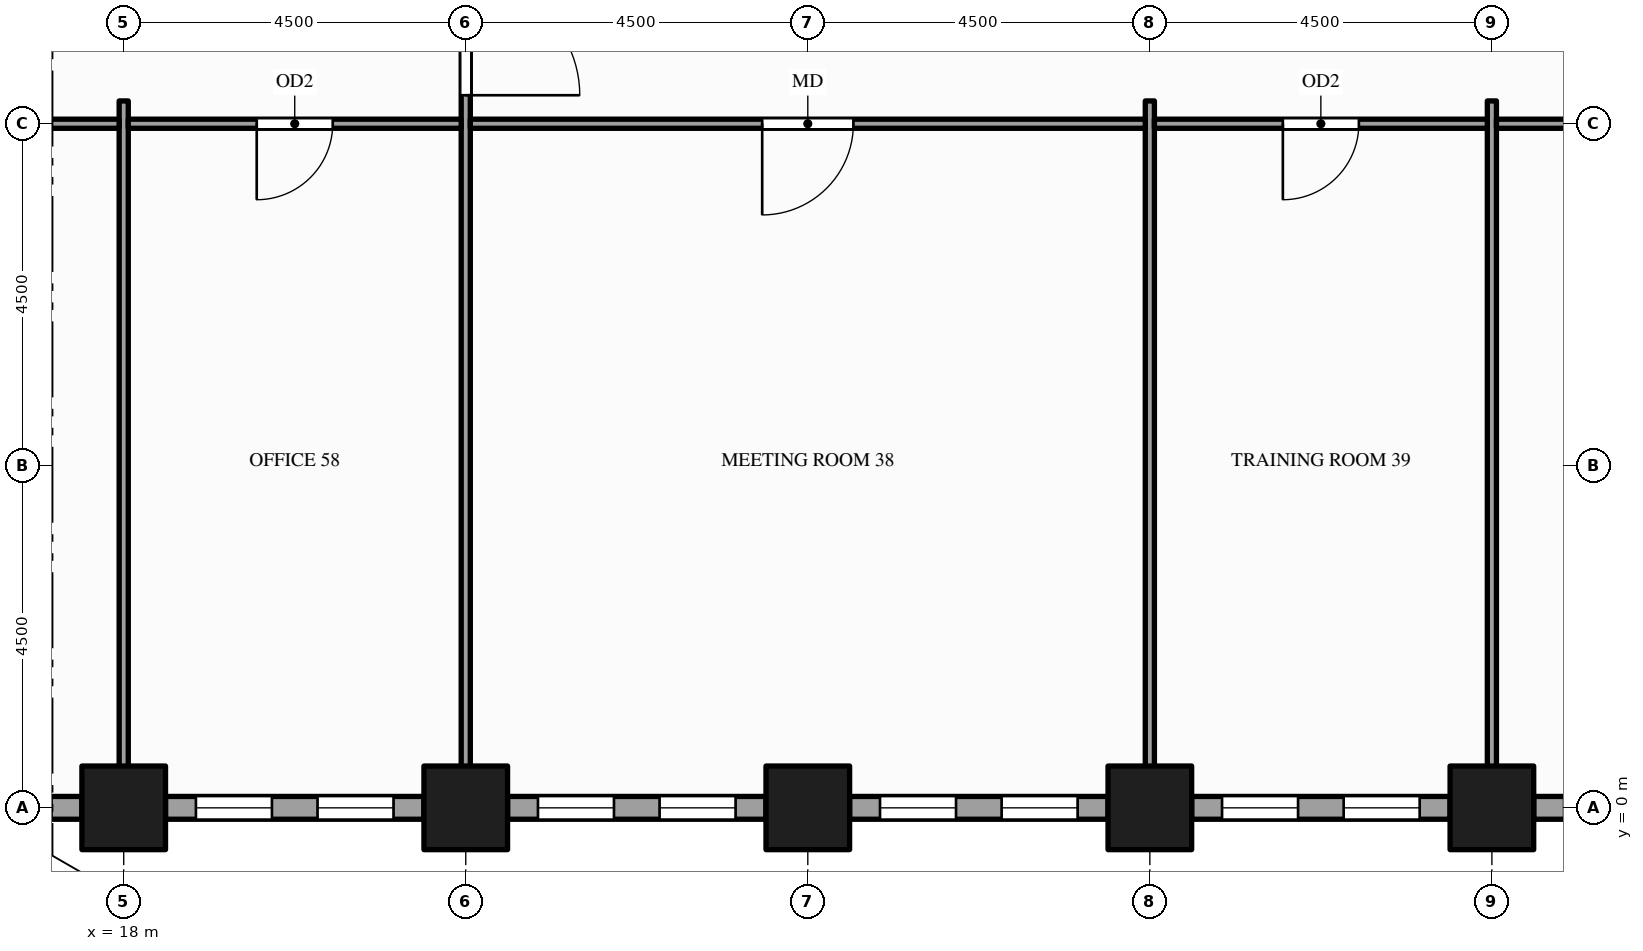
"""IFC4 building model, lengths in metres.
Left out: names, types, materials, properties, quantities, classifications, styles, units other than length and angle.
Written with IfcOpenShell. Run it as: python <this file> out.ifc"""

import sys

from ifc_helpers import new_model, si_unit, direction, frame, frame_2d, origin, origin_2d, place, context, subcontext, project, spatial, rectangle, hollow_rectangle, extrude, element, fill, save


model = new_model("IFC4")
c1 = context("Model", 3, precision=1e-05, world=origin(), true_north=direction((0.0, 1.0)))
c2 = subcontext(c1, "Body", "Model", "MODEL_VIEW")
j1 = project(units=[si_unit("LENGTHUNIT", "METRE"), si_unit("PLANEANGLEUNIT", "RADIAN")], contexts=[c1])
p1 = place(None, origin())
s1 = spatial("IfcSite", under=j1, at=p1, CompositionType="ELEMENT")
p2 = place(p1, origin())
s2 = spatial("IfcBuilding", under=s1, at=p2, CompositionType="ELEMENT")
p3 = place(p2, frame((0.0, 0.0, 8.0)))
s3 = spatial("IfcBuildingStorey", under=s2, at=p3, CompositionType="ELEMENT", Elevation=8.0)
for number, where, z_axis, x_axis in (
    (1, (18.0, 0.0, -0.25), (0.0, 0.0, 1.0), (1.0, 0.0, 0.0)),
    (2, (22.5, 0.0, -0.25), (0.0, 0.0, 1.0), (1.0, 0.0, 0.0)),
    (3, (27.0, 0.0, -0.25), (0.0, 0.0, 1.0), (1.0, 0.0, 0.0)),
    (4, (31.5, 0.0, -0.25), (0.0, 0.0, 1.0), (1.0, 0.0, 0.0)),
    (5, (36.0, 0.0, -0.25), (0.0, 0.0, 1.0), (1.0, 0.0, 0.0)),
):
    element("IfcColumn", number, at=place(p3, frame(where, z_axis=z_axis, x_axis=x_axis)), inside=s3, PredefinedType="COLUMN", context=c2, shape_type="SweptSolid", body=[
        extrude(hollow_rectangle(XDim=1.1, YDim=1.1, WallThickness=0.06, at=origin_2d()), origin(), (0.0, 0.0, 1.0), 6.0),
    ])
p4 = place(p3, frame((14.05, 0.0, 0.0), z_axis=(0.0, 0.0, 1.0), x_axis=(1.0, 0.0, 0.0)))
e6 = element("IfcWall", 6, at=p4, inside=s3, PredefinedType="STANDARD", context=c2, shape_type="SweptSolid", body=[
    extrude(rectangle(XDim=3.4, YDim=0.3, at=frame_2d((1.7, 0.0))), origin(), (0.0, 0.0, 1.0), 5.036),
])
p5 = place(p4, frame((0.4, 0.0, 0.9)))
e7 = element("IfcOpeningElement", 7, at=p5, cuts=e6, PredefinedType="OPENING", context=c2, shape_type="SweptSolid", body=[
    extrude(rectangle(XDim=1.0, YDim=3.5, at=frame_2d((0.5, 1.75))), frame((0.0, 0.16, 0.0), z_axis=(0.0, -1.0, 0.0), x_axis=(1.0, 0.0, 0.0)), (0.0, 0.0, 1.0), 0.32),
])
p6 = place(p4, frame((2.0, 0.0, 0.9)))
e8 = element("IfcOpeningElement", 8, at=p6, cuts=e6, PredefinedType="OPENING", context=c2, shape_type="SweptSolid", body=[
    extrude(rectangle(XDim=1.0, YDim=3.5, at=frame_2d((0.5, 1.75))), frame((0.0, 0.16, 0.0), z_axis=(0.0, -1.0, 0.0), x_axis=(1.0, 0.0, 0.0)), (0.0, 0.0, 1.0), 0.32),
])
p7 = place(p3, frame((18.55, 0.0, 0.0), z_axis=(0.0, 0.0, 1.0), x_axis=(1.0, 0.0, 0.0)))
e9 = element("IfcWall", 9, at=p7, inside=s3, PredefinedType="STANDARD", context=c2, shape_type="SweptSolid", body=[
    extrude(rectangle(XDim=3.4, YDim=0.3, at=frame_2d((1.7, 0.0))), origin(), (0.0, 0.0, 1.0), 5.036),
])
p8 = place(p7, frame((0.4, 0.0, 0.9)))
e10 = element("IfcOpeningElement", 10, at=p8, cuts=e9, PredefinedType="OPENING", context=c2, shape_type="SweptSolid", body=[
    extrude(rectangle(XDim=1.0, YDim=3.5, at=frame_2d((0.5, 1.75))), frame((0.0, 0.16, 0.0), z_axis=(0.0, -1.0, 0.0), x_axis=(1.0, 0.0, 0.0)), (0.0, 0.0, 1.0), 0.32),
])
p9 = place(p7, frame((2.0, 0.0, 0.9)))
e11 = element("IfcOpeningElement", 11, at=p9, cuts=e9, PredefinedType="OPENING", context=c2, shape_type="SweptSolid", body=[
    extrude(rectangle(XDim=1.0, YDim=3.5, at=frame_2d((0.5, 1.75))), frame((0.0, 0.16, 0.0), z_axis=(0.0, -1.0, 0.0), x_axis=(1.0, 0.0, 0.0)), (0.0, 0.0, 1.0), 0.32),
])
p10 = place(p3, frame((23.05, 0.0, 0.0), z_axis=(0.0, 0.0, 1.0), x_axis=(1.0, 0.0, 0.0)))
e12 = element("IfcWall", 12, at=p10, inside=s3, PredefinedType="STANDARD", context=c2, shape_type="SweptSolid", body=[
    extrude(rectangle(XDim=3.4, YDim=0.3, at=frame_2d((1.7, 0.0))), origin(), (0.0, 0.0, 1.0), 5.036),
])
p11 = place(p10, frame((0.4, 0.0, 0.9)))
e13 = element("IfcOpeningElement", 13, at=p11, cuts=e12, PredefinedType="OPENING", context=c2, shape_type="SweptSolid", body=[
    extrude(rectangle(XDim=1.0, YDim=3.5, at=frame_2d((0.5, 1.75))), frame((0.0, 0.16, 0.0), z_axis=(0.0, -1.0, 0.0), x_axis=(1.0, 0.0, 0.0)), (0.0, 0.0, 1.0), 0.32),
])
p12 = place(p10, frame((2.0, 0.0, 0.9)))
e14 = element("IfcOpeningElement", 14, at=p12, cuts=e12, PredefinedType="OPENING", context=c2, shape_type="SweptSolid", body=[
    extrude(rectangle(XDim=1.0, YDim=3.5, at=frame_2d((0.5, 1.75))), frame((0.0, 0.16, 0.0), z_axis=(0.0, -1.0, 0.0), x_axis=(1.0, 0.0, 0.0)), (0.0, 0.0, 1.0), 0.32),
])
p13 = place(p3, frame((27.55, 0.0, 0.0), z_axis=(0.0, 0.0, 1.0), x_axis=(1.0, 0.0, 0.0)))
e15 = element("IfcWall", 15, at=p13, inside=s3, PredefinedType="STANDARD", context=c2, shape_type="SweptSolid", body=[
    extrude(rectangle(XDim=3.4, YDim=0.3, at=frame_2d((1.7, 0.0))), origin(), (0.0, 0.0, 1.0), 5.036),
])
p14 = place(p13, frame((0.4, 0.0, 0.9)))
e16 = element("IfcOpeningElement", 16, at=p14, cuts=e15, PredefinedType="OPENING", context=c2, shape_type="SweptSolid", body=[
    extrude(rectangle(XDim=1.0, YDim=3.5, at=frame_2d((0.5, 1.75))), frame((0.0, 0.16, 0.0), z_axis=(0.0, -1.0, 0.0), x_axis=(1.0, 0.0, 0.0)), (0.0, 0.0, 1.0), 0.32),
])
p15 = place(p13, frame((2.0, 0.0, 0.9)))
e17 = element("IfcOpeningElement", 17, at=p15, cuts=e15, PredefinedType="OPENING", context=c2, shape_type="SweptSolid", body=[
    extrude(rectangle(XDim=1.0, YDim=3.5, at=frame_2d((0.5, 1.75))), frame((0.0, 0.16, 0.0), z_axis=(0.0, -1.0, 0.0), x_axis=(1.0, 0.0, 0.0)), (0.0, 0.0, 1.0), 0.32),
])
p16 = place(p3, frame((32.05, 0.0, 0.0), z_axis=(0.0, 0.0, 1.0), x_axis=(1.0, 0.0, 0.0)))
e18 = element("IfcWall", 18, at=p16, inside=s3, PredefinedType="STANDARD", context=c2, shape_type="SweptSolid", body=[
    extrude(rectangle(XDim=3.4, YDim=0.3, at=frame_2d((1.7, 0.0))), origin(), (0.0, 0.0, 1.0), 5.036),
])
p17 = place(p16, frame((0.4, 0.0, 0.9)))
e19 = element("IfcOpeningElement", 19, at=p17, cuts=e18, PredefinedType="OPENING", context=c2, shape_type="SweptSolid", body=[
    extrude(rectangle(XDim=1.0, YDim=3.5, at=frame_2d((0.5, 1.75))), frame((0.0, 0.16, 0.0), z_axis=(0.0, -1.0, 0.0), x_axis=(1.0, 0.0, 0.0)), (0.0, 0.0, 1.0), 0.32),
])
p18 = place(p16, frame((2.0, 0.0, 0.9)))
e20 = element("IfcOpeningElement", 20, at=p18, cuts=e18, PredefinedType="OPENING", context=c2, shape_type="SweptSolid", body=[
    extrude(rectangle(XDim=1.0, YDim=3.5, at=frame_2d((0.5, 1.75))), frame((0.0, 0.16, 0.0), z_axis=(0.0, -1.0, 0.0), x_axis=(1.0, 0.0, 0.0)), (0.0, 0.0, 1.0), 0.32),
])
p19 = place(p3, frame((36.55, 0.0, 0.0), z_axis=(0.0, 0.0, 1.0), x_axis=(1.0, 0.0, 0.0)))
e21 = element("IfcWall", 21, at=p19, inside=s3, PredefinedType="STANDARD", context=c2, shape_type="SweptSolid", body=[
    extrude(rectangle(XDim=3.4, YDim=0.3, at=frame_2d((1.7, 0.0))), origin(), (0.0, 0.0, 1.0), 5.036),
])
p20 = place(p19, frame((0.4, 0.0, 0.9)))
e22 = element("IfcOpeningElement", 22, at=p20, cuts=e21, PredefinedType="OPENING", context=c2, shape_type="SweptSolid", body=[
    extrude(rectangle(XDim=1.0, YDim=3.5, at=frame_2d((0.5, 1.75))), frame((0.0, 0.16, 0.0), z_axis=(0.0, -1.0, 0.0), x_axis=(1.0, 0.0, 0.0)), (0.0, 0.0, 1.0), 0.32),
])
p21 = place(p19, frame((2.0, 0.0, 0.9)))
e23 = element("IfcOpeningElement", 23, at=p21, cuts=e21, PredefinedType="OPENING", context=c2, shape_type="SweptSolid", body=[
    extrude(rectangle(XDim=1.0, YDim=3.5, at=frame_2d((0.5, 1.75))), frame((0.0, 0.16, 0.0), z_axis=(0.0, -1.0, 0.0), x_axis=(1.0, 0.0, 0.0)), (0.0, 0.0, 1.0), 0.32),
])
p22 = place(p3, frame((18.0, 0.15, 0.0), z_axis=(0.0, 0.0, 1.0), x_axis=(0.0, 1.0, 0.0)))
e24 = element("IfcWall", 24, at=p22, inside=s3, PredefinedType="PARTITIONING", context=c2, shape_type="SweptSolid", body=[
    extrude(rectangle(XDim=9.15, YDim=0.12, at=frame_2d((4.575, 0.0))), origin(), (0.0, 0.0, 1.0), 4.759),
])
p23 = place(p3, frame((22.5, 0.15, 0.0), z_axis=(0.0, 0.0, 1.0), x_axis=(0.0, 1.0, 0.0)))
e25 = element("IfcWall", 25, at=p23, inside=s3, PredefinedType="PARTITIONING", context=c2, shape_type="SweptSolid", body=[
    extrude(rectangle(XDim=35.95, YDim=0.12, at=frame_2d((17.975, 0.0))), origin(), (0.0, 0.0, 1.0), 4.759),
])
p24 = place(p23, frame((9.225, 0.0, 0.0)))
e26 = element("IfcOpeningElement", 26, at=p24, cuts=e25, PredefinedType="OPENING", context=c2, shape_type="SweptSolid", body=[
    extrude(rectangle(XDim=1.5, YDim=2.1, at=frame_2d((0.75, 1.05))), frame((0.0, 0.07, 0.0), z_axis=(0.0, -1.0, 0.0), x_axis=(1.0, 0.0, 0.0)), (0.0, 0.0, 1.0), 0.14),
])
p25 = place(p23, frame((32.7, 0.0, 0.0)))
e27 = element("IfcOpeningElement", 27, at=p25, cuts=e25, PredefinedType="OPENING", context=c2, shape_type="SweptSolid", body=[
    extrude(rectangle(XDim=1.8, YDim=2.1, at=frame_2d((0.9, 1.05))), frame((0.0, 0.07, 0.0), z_axis=(0.0, -1.0, 0.0), x_axis=(1.0, 0.0, 0.0)), (0.0, 0.0, 1.0), 0.14),
])
for number, where, z_axis, x_axis in (
    (28, (31.5, 0.15, 0.0), (0.0, 0.0, 1.0), (0.0, 1.0, 0.0)),
    (29, (36.0, 0.15, 0.0), (0.0, 0.0, 1.0), (0.0, 1.0, 0.0)),
):
    element("IfcWall", number, at=place(p3, frame(where, z_axis=z_axis, x_axis=x_axis)), inside=s3, PredefinedType="PARTITIONING", context=c2, shape_type="SweptSolid", body=[
        extrude(rectangle(XDim=9.15, YDim=0.12, at=frame_2d((4.575, 0.0))), origin(), (0.0, 0.0, 1.0), 4.759),
    ])
p26 = place(p3, frame((9.06, 9.0, 0.0), z_axis=(0.0, 0.0, 1.0), x_axis=(1.0, 0.0, 0.0)))
e30 = element("IfcWall", 30, at=p26, inside=s3, PredefinedType="PARTITIONING", context=c2, shape_type="SweptSolid", body=[
    extrude(rectangle(XDim=8.88, YDim=0.12, at=frame_2d((4.44, 0.0))), origin(), (0.0, 0.0, 1.0), 4.759),
])
p27 = place(p26, frame((3.94, 0.0, 0.0)))
e31 = element("IfcOpeningElement", 31, at=p27, cuts=e30, PredefinedType="OPENING", context=c2, shape_type="SweptSolid", body=[
    extrude(rectangle(XDim=1.0, YDim=2.1, at=frame_2d((0.5, 1.05))), frame((0.0, 0.07, 0.0), z_axis=(0.0, -1.0, 0.0), x_axis=(1.0, 0.0, 0.0)), (0.0, 0.0, 1.0), 0.14),
])
p28 = place(p3, frame((18.06, 9.0, 0.0), z_axis=(0.0, 0.0, 1.0), x_axis=(1.0, 0.0, 0.0)))
e32 = element("IfcWall", 32, at=p28, inside=s3, PredefinedType="PARTITIONING", context=c2, shape_type="SweptSolid", body=[
    extrude(rectangle(XDim=4.38, YDim=0.12, at=frame_2d((2.19, 0.0))), origin(), (0.0, 0.0, 1.0), 4.759),
])
p29 = place(p28, frame((1.69, 0.0, 0.0)))
e33 = element("IfcOpeningElement", 33, at=p29, cuts=e32, PredefinedType="OPENING", context=c2, shape_type="SweptSolid", body=[
    extrude(rectangle(XDim=1.0, YDim=2.1, at=frame_2d((0.5, 1.05))), frame((0.0, 0.07, 0.0), z_axis=(0.0, -1.0, 0.0), x_axis=(1.0, 0.0, 0.0)), (0.0, 0.0, 1.0), 0.14),
])
p30 = place(p3, frame((22.56, 9.0, 0.0), z_axis=(0.0, 0.0, 1.0), x_axis=(1.0, 0.0, 0.0)))
e34 = element("IfcWall", 34, at=p30, inside=s3, PredefinedType="PARTITIONING", context=c2, shape_type="SweptSolid", body=[
    extrude(rectangle(XDim=8.88, YDim=0.12, at=frame_2d((4.44, 0.0))), origin(), (0.0, 0.0, 1.0), 4.66),
])
p31 = place(p30, frame((3.84, 0.0, 0.0)))
e35 = element("IfcOpeningElement", 35, at=p31, cuts=e34, PredefinedType="OPENING", context=c2, shape_type="SweptSolid", body=[
    extrude(rectangle(XDim=1.2, YDim=2.1, at=frame_2d((0.6, 1.05))), frame((0.0, 0.07, 0.0), z_axis=(0.0, -1.0, 0.0), x_axis=(1.0, 0.0, 0.0)), (0.0, 0.0, 1.0), 0.14),
])
p32 = place(p3, frame((31.56, 9.0, 0.0), z_axis=(0.0, 0.0, 1.0), x_axis=(1.0, 0.0, 0.0)))
e36 = element("IfcWall", 36, at=p32, inside=s3, PredefinedType="PARTITIONING", context=c2, shape_type="SweptSolid", body=[
    extrude(rectangle(XDim=4.38, YDim=0.12, at=frame_2d((2.19, 0.0))), origin(), (0.0, 0.0, 1.0), 4.66),
])
p33 = place(p32, frame((1.69, 0.0, 0.0)))
e37 = element("IfcOpeningElement", 37, at=p33, cuts=e36, PredefinedType="OPENING", context=c2, shape_type="SweptSolid", body=[
    extrude(rectangle(XDim=1.0, YDim=2.1, at=frame_2d((0.5, 1.05))), frame((0.0, 0.07, 0.0), z_axis=(0.0, -1.0, 0.0), x_axis=(1.0, 0.0, 0.0)), (0.0, 0.0, 1.0), 0.14),
])
p34 = place(p3, frame((36.06, 9.0, 0.0), z_axis=(0.0, 0.0, 1.0), x_axis=(1.0, 0.0, 0.0)))
e38 = element("IfcWall", 38, at=p34, inside=s3, PredefinedType="PARTITIONING", context=c2, shape_type="SweptSolid", body=[
    extrude(rectangle(XDim=4.38, YDim=0.12, at=frame_2d((2.19, 0.0))), origin(), (0.0, 0.0, 1.0), 4.66),
])
p35 = place(p34, frame((1.69, 0.0, 0.0)))
e39 = element("IfcOpeningElement", 39, at=p35, cuts=e38, PredefinedType="OPENING", context=c2, shape_type="SweptSolid", body=[
    extrude(rectangle(XDim=1.0, YDim=2.1, at=frame_2d((0.5, 1.05))), frame((0.0, 0.07, 0.0), z_axis=(0.0, -1.0, 0.0), x_axis=(1.0, 0.0, 0.0)), (0.0, 0.0, 1.0), 0.14),
])
p36 = place(p8, origin())
e40 = element("IfcWindow", 40, at=p36, inside=s3, PartitioningType="SINGLE_PANEL", PredefinedType="WINDOW", context=c2, shape_type="SweptSolid", body=[
    extrude(rectangle(XDim=1.0, YDim=3.5, at=frame_2d((0.5, 1.75))), frame((0.0, 0.03, 0.0), z_axis=(0.0, -1.0, 0.0), x_axis=(1.0, 0.0, 0.0)), (0.0, 0.0, 1.0), 0.06),
])
fill(e10, e40)
p37 = place(p9, origin())
e41 = element("IfcWindow", 41, at=p37, inside=s3, PartitioningType="SINGLE_PANEL", PredefinedType="WINDOW", context=c2, shape_type="SweptSolid", body=[
    extrude(rectangle(XDim=1.0, YDim=3.5, at=frame_2d((0.5, 1.75))), frame((0.0, 0.03, 0.0), z_axis=(0.0, -1.0, 0.0), x_axis=(1.0, 0.0, 0.0)), (0.0, 0.0, 1.0), 0.06),
])
fill(e11, e41)
p38 = place(p11, origin())
e42 = element("IfcWindow", 42, at=p38, inside=s3, PartitioningType="SINGLE_PANEL", PredefinedType="WINDOW", context=c2, shape_type="SweptSolid", body=[
    extrude(rectangle(XDim=1.0, YDim=3.5, at=frame_2d((0.5, 1.75))), frame((0.0, 0.03, 0.0), z_axis=(0.0, -1.0, 0.0), x_axis=(1.0, 0.0, 0.0)), (0.0, 0.0, 1.0), 0.06),
])
fill(e13, e42)
p39 = place(p12, origin())
e43 = element("IfcWindow", 43, at=p39, inside=s3, PartitioningType="SINGLE_PANEL", PredefinedType="WINDOW", context=c2, shape_type="SweptSolid", body=[
    extrude(rectangle(XDim=1.0, YDim=3.5, at=frame_2d((0.5, 1.75))), frame((0.0, 0.03, 0.0), z_axis=(0.0, -1.0, 0.0), x_axis=(1.0, 0.0, 0.0)), (0.0, 0.0, 1.0), 0.06),
])
fill(e14, e43)
p40 = place(p14, origin())
e44 = element("IfcWindow", 44, at=p40, inside=s3, PartitioningType="SINGLE_PANEL", PredefinedType="WINDOW", context=c2, shape_type="SweptSolid", body=[
    extrude(rectangle(XDim=1.0, YDim=3.5, at=frame_2d((0.5, 1.75))), frame((0.0, 0.03, 0.0), z_axis=(0.0, -1.0, 0.0), x_axis=(1.0, 0.0, 0.0)), (0.0, 0.0, 1.0), 0.06),
])
fill(e16, e44)
p41 = place(p15, origin())
e45 = element("IfcWindow", 45, at=p41, inside=s3, PartitioningType="SINGLE_PANEL", PredefinedType="WINDOW", context=c2, shape_type="SweptSolid", body=[
    extrude(rectangle(XDim=1.0, YDim=3.5, at=frame_2d((0.5, 1.75))), frame((0.0, 0.03, 0.0), z_axis=(0.0, -1.0, 0.0), x_axis=(1.0, 0.0, 0.0)), (0.0, 0.0, 1.0), 0.06),
])
fill(e17, e45)
p42 = place(p17, origin())
e46 = element("IfcWindow", 46, at=p42, inside=s3, PartitioningType="SINGLE_PANEL", PredefinedType="WINDOW", context=c2, shape_type="SweptSolid", body=[
    extrude(rectangle(XDim=1.0, YDim=3.5, at=frame_2d((0.5, 1.75))), frame((0.0, 0.03, 0.0), z_axis=(0.0, -1.0, 0.0), x_axis=(1.0, 0.0, 0.0)), (0.0, 0.0, 1.0), 0.06),
])
fill(e19, e46)
p43 = place(p18, origin())
e47 = element("IfcWindow", 47, at=p43, inside=s3, PartitioningType="SINGLE_PANEL", PredefinedType="WINDOW", context=c2, shape_type="SweptSolid", body=[
    extrude(rectangle(XDim=1.0, YDim=3.5, at=frame_2d((0.5, 1.75))), frame((0.0, 0.03, 0.0), z_axis=(0.0, -1.0, 0.0), x_axis=(1.0, 0.0, 0.0)), (0.0, 0.0, 1.0), 0.06),
])
fill(e20, e47)
p44 = place(p31, origin())
e48 = element("IfcDoor", 48, at=p44, inside=s3, OperationType="SINGLE_SWING_LEFT", PredefinedType="DOOR", context=c2, shape_type="SweptSolid", body=[
    extrude(rectangle(XDim=1.2, YDim=2.1, at=frame_2d((0.6, 1.05))), frame((0.0, 0.025, 0.0), z_axis=(0.0, -1.0, 0.0), x_axis=(1.0, 0.0, 0.0)), (0.0, 0.0, 1.0), 0.05),
])
fill(e35, e48)
p45 = place(p33, origin())
e49 = element("IfcDoor", 49, at=p45, inside=s3, OperationType="SINGLE_SWING_LEFT", PredefinedType="DOOR", context=c2, shape_type="SweptSolid", body=[
    extrude(rectangle(XDim=1.0, YDim=2.1, at=frame_2d((0.5, 1.05))), frame((0.0, 0.025, 0.0), z_axis=(0.0, -1.0, 0.0), x_axis=(1.0, 0.0, 0.0)), (0.0, 0.0, 1.0), 0.05),
])
fill(e37, e49)
p46 = place(p24, origin())
e50 = element("IfcDoor", 50, at=p46, inside=s3, OperationType="SINGLE_SWING_LEFT", PredefinedType="DOOR", context=c2, shape_type="SweptSolid", body=[
    extrude(rectangle(XDim=1.5, YDim=2.1, at=frame_2d((0.75, 1.05))), frame((0.0, 0.025, 0.0), z_axis=(0.0, -1.0, 0.0), x_axis=(1.0, 0.0, 0.0)), (0.0, 0.0, 1.0), 0.05),
])
fill(e26, e50)
p47 = place(p29, origin())
e51 = element("IfcDoor", 51, at=p47, inside=s3, OperationType="SINGLE_SWING_LEFT", PredefinedType="DOOR", context=c2, shape_type="SweptSolid", body=[
    extrude(rectangle(XDim=1.0, YDim=2.1, at=frame_2d((0.5, 1.05))), frame((0.0, 0.025, 0.0), z_axis=(0.0, -1.0, 0.0), x_axis=(1.0, 0.0, 0.0)), (0.0, 0.0, 1.0), 0.05),
])
fill(e33, e51)
save(model, sys.argv[1])
